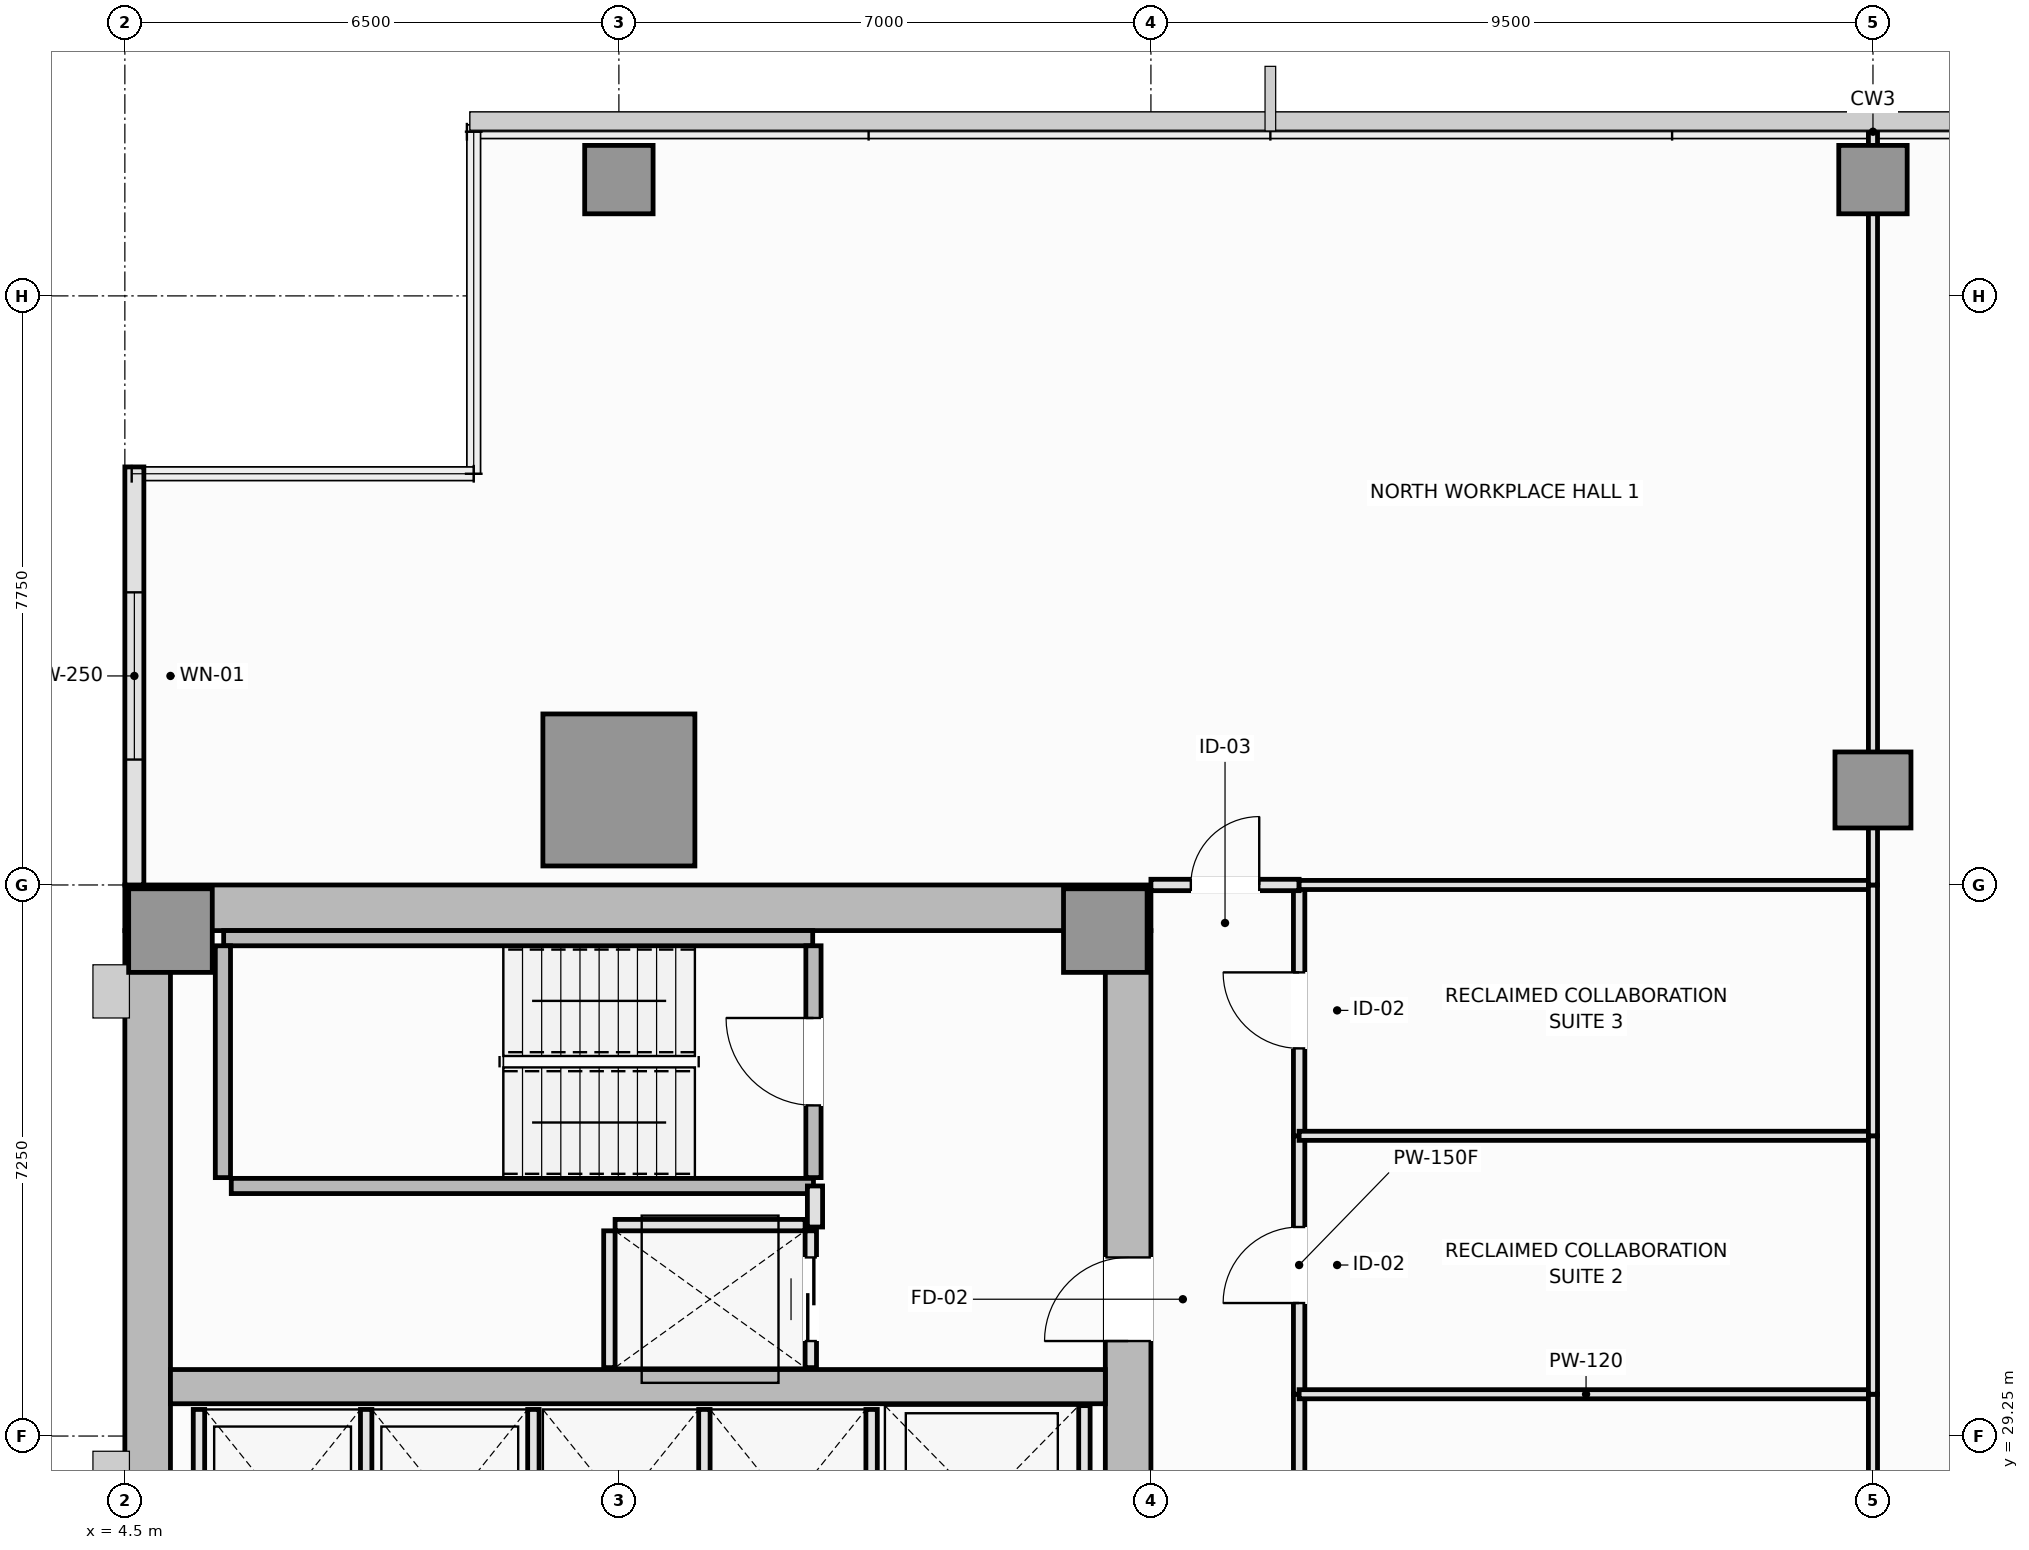
"""IFC4 building model, lengths in metres.
Left out: names, types, materials, properties, quantities, classifications, styles, units other than length and angle.
Written with IfcOpenShell. Run it as: python <this file> out.ifc"""

import sys

from ifc_helpers import new_model, si_unit, direction, frame, frame_2d, origin, origin_2d, place, context, subcontext, project, spatial, rectangle, extrude, element, fill, save


model = new_model("IFC4")
c1 = context("Model", 3, precision=1e-05, world=origin(), true_north=direction((0.0, 1.0)))
c2 = subcontext(c1, "Body", "Model", "MODEL_VIEW")
j1 = project(units=[si_unit("LENGTHUNIT", "METRE"), si_unit("PLANEANGLEUNIT", "RADIAN")], contexts=[c1])
p1 = place(None, origin())
s1 = spatial("IfcSite", under=j1, at=p1, CompositionType="ELEMENT")
p2 = place(p1, origin())
s2 = spatial("IfcBuilding", under=s1, at=p2, CompositionType="ELEMENT")
p3 = place(p2, frame((0.0, 0.0, 134.2)))
s3 = spatial("IfcBuildingStorey", under=s2, at=p3, CompositionType="ELEMENT", Elevation=134.2)
p4 = place(p3, frame((4.5, 36.2, 0.0), z_axis=(0.0, 0.0, 1.0), x_axis=(1.0, 0.0, 0.0)))
e1 = element("IfcWall", 1, at=p4, inside=s3, PredefinedType="SHEAR", context=c2, shape_type="SweptSolid", body=[
    extrude(rectangle(XDim=13.5, YDim=0.6, at=frame_2d((6.75, 0.0))), origin(), (0.0, 0.0, 1.0), 3.55),
])
p5 = place(p3, frame((4.8, 14.6, 0.0), z_axis=(0.0, 0.0, 1.0), x_axis=(0.0, 1.0, 0.0)))
e2 = element("IfcWall", 2, at=p5, inside=s3, PredefinedType="SHEAR", context=c2, shape_type="SweptSolid", body=[
    extrude(rectangle(XDim=21.3, YDim=0.6, at=frame_2d((10.65, 0.0))), origin(), (0.0, 0.0, 1.0), 3.55),
])
p6 = place(p3, frame((17.7, 27.05, 0.0), z_axis=(0.0, 0.0, 1.0), x_axis=(0.0, 1.0, 0.0)))
e3 = element("IfcWall", 3, at=p6, inside=s3, PredefinedType="SHEAR", context=c2, shape_type="SweptSolid", body=[
    extrude(rectangle(XDim=8.85, YDim=0.6, at=frame_2d((4.425, 0.0))), origin(), (0.0, 0.0, 1.0), 3.55),
])
p7 = place(p6, frame((3.45, 0.0, 0.0)))
e4 = element("IfcOpeningElement", 4, at=p7, cuts=e3, PredefinedType="OPENING", context=c2, shape_type="SweptSolid", body=[
    extrude(rectangle(XDim=1.1, YDim=2.15, at=frame_2d((0.55, 1.075))), frame((0.0, 0.31, 0.0), z_axis=(0.0, -1.0, 0.0), x_axis=(1.0, 0.0, 0.0)), (0.0, 0.0, 1.0), 0.62),
])
p8 = place(p3, frame((5.1, 29.9, 0.0), z_axis=(0.0, 0.0, 1.0), x_axis=(1.0, 0.0, 0.0)))
e5 = element("IfcWall", 5, at=p8, inside=s3, PredefinedType="SHEAR", context=c2, shape_type="SweptSolid", body=[
    extrude(rectangle(XDim=12.3, YDim=0.45, at=frame_2d((6.15, 0.0))), origin(), (0.0, 0.0, 1.0), 3.55),
])
for number, where, z_axis, x_axis in (
    (6, (5.1, 35.9, 0.0), (0.0, 0.0, 1.0), (1.0, 0.0, 0.0)),
    (7, (17.4, 35.9, 0.0), (0.0, 0.0, 1.0), (1.0, 0.0, 0.0)),
):
    element("IfcColumn", number, at=place(p3, frame(where, z_axis=z_axis, x_axis=x_axis)), inside=s3, PredefinedType="PILASTER", context=c2, shape_type="SweptSolid", body=[
        extrude(rectangle(XDim=1.1, YDim=1.1, at=origin_2d()), origin(), (0.0, 0.0, 1.0), 3.55),
    ])
p9 = place(p3, frame((11.0, 37.75, 0.0), z_axis=(0.0, 0.0, 1.0), x_axis=(1.0, 0.0, 0.0)))
e8 = element("IfcColumn", 8, at=p9, inside=s3, PredefinedType="COLUMN", context=c2, shape_type="SweptSolid", body=[
    extrude(rectangle(XDim=2.0, YDim=2.0, at=origin_2d()), origin(), (0.0, 0.0, 1.0), 3.55),
])
p10 = place(p3, frame((27.5, 37.75, 0.0), z_axis=(0.0, 0.0, 1.0), x_axis=(1.0, 0.0, 0.0)))
e9 = element("IfcColumn", 9, at=p10, inside=s3, PredefinedType="COLUMN", context=c2, shape_type="SweptSolid", body=[
    extrude(rectangle(XDim=1.0, YDim=1.0, at=origin_2d()), origin(), (0.0, 0.0, 1.0), 3.55),
])
for number, where, z_axis, x_axis in (
    (10, (11.0, 45.78, 0.0), (0.0, 0.0, 1.0), (1.0, 0.0, 0.0)),
    (11, (27.5, 45.78, 0.0), (0.0, 0.0, 1.0), (1.0, 0.0, 0.0)),
):
    element("IfcColumn", number, at=place(p3, frame(where, z_axis=z_axis, x_axis=x_axis)), inside=s3, PredefinedType="COLUMN", context=c2, shape_type="SweptSolid", body=[
        extrude(rectangle(XDim=0.9, YDim=0.9, at=origin_2d()), origin(), (0.0, 0.0, 1.0), 3.55),
    ])
p11 = place(p3, frame((4.625, 42.0, 0.0), z_axis=(0.0, 0.0, 1.0), x_axis=(0.0, -1.0, 0.0)))
e12 = element("IfcWall", 12, at=p11, inside=s3, PredefinedType="SOLIDWALL", context=c2, shape_type="SweptSolid", body=[
    extrude(rectangle(XDim=5.5, YDim=0.25, at=frame_2d((2.75, 0.0))), origin(), (0.0, 0.0, 1.0), 3.37),
])
p12 = place(p11, frame((1.65, 0.0, 0.9)))
e13 = element("IfcOpeningElement", 13, at=p12, cuts=e12, PredefinedType="OPENING", context=c2, shape_type="SweptSolid", body=[
    extrude(rectangle(XDim=2.2, YDim=1.8, at=frame_2d((1.1, 0.9))), frame((0.0, 0.135, 0.0), z_axis=(0.0, -1.0, 0.0), x_axis=(1.0, 0.0, 0.0)), (0.0, 0.0, 1.0), 0.27),
])
p13 = place(p3, frame((5.8, 35.8, 0.0), z_axis=(0.0, 0.0, 1.0), x_axis=(1.0, 0.0, 0.0)))
e14 = element("IfcWall", 14, at=p13, inside=s3, PredefinedType="SOLIDWALL", context=c2, shape_type="SweptSolid", body=[
    extrude(rectangle(XDim=7.75, YDim=0.2, at=frame_2d((3.875, 0.0))), origin(), (0.0, 0.0, 1.0), 3.55),
])
p14 = place(p3, frame((5.79, 32.65, 0.0), z_axis=(0.0, 0.0, 1.0), x_axis=(0.0, 1.0, 0.0)))
e15 = element("IfcWall", 15, at=p14, inside=s3, PredefinedType="SOLIDWALL", context=c2, shape_type="SweptSolid", body=[
    extrude(rectangle(XDim=3.05, YDim=0.2, at=frame_2d((1.525, 0.0))), origin(), (0.0, 0.0, 1.0), 3.55),
])
p15 = place(p3, frame((5.9, 32.54, 0.0), z_axis=(0.0, 0.0, 1.0), x_axis=(1.0, 0.0, 0.0)))
e16 = element("IfcWall", 16, at=p15, inside=s3, PredefinedType="SOLIDWALL", context=c2, shape_type="SweptSolid", body=[
    extrude(rectangle(XDim=7.66, YDim=0.2, at=frame_2d((3.83, 0.0))), origin(), (0.0, 0.0, 1.0), 3.55),
])
p16 = place(p3, frame((13.56, 32.65, 0.0), z_axis=(0.0, 0.0, 1.0), x_axis=(0.0, 1.0, 0.0)))
e17 = element("IfcWall", 17, at=p16, inside=s3, PredefinedType="SOLIDWALL", context=c2, shape_type="SweptSolid", body=[
    extrude(rectangle(XDim=3.05, YDim=0.2, at=frame_2d((1.525, 0.0))), origin(), (0.0, 0.0, 1.0), 3.55),
])
p17 = place(p16, frame((0.95, 0.0, 0.0)))
e18 = element("IfcOpeningElement", 18, at=p17, cuts=e17, PredefinedType="OPENING", context=c2, shape_type="SweptSolid", body=[
    extrude(rectangle(XDim=1.15, YDim=2.15, at=frame_2d((0.575, 1.075))), frame((0.0, 0.11, 0.0), z_axis=(0.0, -1.0, 0.0), x_axis=(1.0, 0.0, 0.0)), (0.0, 0.0, 1.0), 0.22),
])
for number, where, z_axis, x_axis in (
    (19, (5.475, 27.05, 0.0), (0.0, 0.0, 1.0), (0.0, 1.0, 0.0)),
    (20, (7.675, 27.05, 0.0), (0.0, 0.0, 1.0), (0.0, 1.0, 0.0)),
    (21, (9.875, 27.05, 0.0), (0.0, 0.0, 1.0), (0.0, 1.0, 0.0)),
    (22, (12.125, 27.05, 0.0), (0.0, 0.0, 1.0), (0.0, 1.0, 0.0)),
    (23, (14.325, 27.05, 0.0), (0.0, 0.0, 1.0), (0.0, 1.0, 0.0)),
):
    element("IfcWall", number, at=place(p3, frame(where, z_axis=z_axis, x_axis=x_axis)), inside=s3, PredefinedType="PARTITIONING", context=c2, shape_type="SweptSolid", body=[
        extrude(rectangle(XDim=2.55, YDim=0.15, at=frame_2d((1.275, 0.0))), origin(), (0.0, 0.0, 1.0), 3.37),
    ])
p18 = place(p3, frame((17.125, 27.05, 0.0), z_axis=(0.0, 0.0, 1.0), x_axis=(0.0, 1.0, 0.0)))
e24 = element("IfcWall", 24, at=p18, inside=s3, PredefinedType="PARTITIONING", context=c2, shape_type="SweptSolid", body=[
    extrude(rectangle(XDim=2.6, YDim=0.15, at=frame_2d((1.3, 0.0))), origin(), (0.0, 0.0, 1.0), 3.37),
])
p19 = place(p3, frame((10.95, 32.025, 0.0), z_axis=(0.0, 0.0, 1.0), x_axis=(1.0, 0.0, 0.0)))
e25 = element("IfcWall", 25, at=p19, inside=s3, PredefinedType="PARTITIONING", context=c2, shape_type="SweptSolid", body=[
    extrude(rectangle(XDim=2.5, YDim=0.15, at=frame_2d((1.25, 0.0))), origin(), (0.0, 0.0, 1.0), 3.37),
])
p20 = place(p3, frame((10.875, 30.15, 0.0), z_axis=(0.0, 0.0, 1.0), x_axis=(0.0, 1.0, 0.0)))
e26 = element("IfcWall", 26, at=p20, inside=s3, PredefinedType="PARTITIONING", context=c2, shape_type="SweptSolid", body=[
    extrude(rectangle(XDim=1.8, YDim=0.15, at=frame_2d((0.9, 0.0))), origin(), (0.0, 0.0, 1.0), 3.37),
])
p21 = place(p3, frame((13.525, 30.15, 0.0), z_axis=(0.0, 0.0, 1.0), x_axis=(0.0, 1.0, 0.0)))
e27 = element("IfcWall", 27, at=p21, inside=s3, PredefinedType="PARTITIONING", context=c2, shape_type="SweptSolid", body=[
    extrude(rectangle(XDim=1.8, YDim=0.15, at=frame_2d((0.9, 0.0))), origin(), (0.0, 0.0, 1.0), 3.37),
])
p22 = place(p21, frame((0.35, 0.0, 0.0)))
e28 = element("IfcOpeningElement", 28, at=p22, cuts=e27, PredefinedType="OPENING", context=c2, shape_type="SweptSolid", body=[
    extrude(rectangle(XDim=1.1, YDim=2.2, at=frame_2d((0.55, 1.1))), frame((0.0, 0.085, 0.0), z_axis=(0.0, -1.0, 0.0), x_axis=(1.0, 0.0, 0.0)), (0.0, 0.0, 1.0), 0.17),
])
p23 = place(p3, frame((13.58, 32.0, 0.0), z_axis=(0.0, 0.0, 1.0), x_axis=(0.0, 1.0, 0.0)))
e29 = element("IfcWall", 29, at=p23, inside=s3, PredefinedType="PARTITIONING", context=c2, shape_type="SweptSolid", body=[
    extrude(rectangle(XDim=0.54, YDim=0.2, at=frame_2d((0.27, 0.0))), origin(), (0.0, 0.0, 1.0), 3.37),
])
p24 = place(p3, frame((19.95, 23.55, 0.0), z_axis=(0.0, 0.0, 1.0), x_axis=(0.0, 1.0, 0.0)))
e30 = element("IfcWall", 30, at=p24, inside=s3, PredefinedType="PARTITIONING", context=c2, shape_type="SweptSolid", body=[
    extrude(rectangle(XDim=6.25, YDim=0.15, at=frame_2d((3.125, 0.0))), origin(), (0.0, 0.0, 1.0), 3.37),
])
p25 = place(p24, frame((2.625, 0.0, 0.0)))
e31 = element("IfcOpeningElement", 31, at=p25, cuts=e30, PredefinedType="OPENING", context=c2, shape_type="SweptSolid", body=[
    extrude(rectangle(XDim=1.0, YDim=2.15, at=frame_2d((0.5, 1.075))), frame((0.0, 0.085, 0.0), z_axis=(0.0, -1.0, 0.0), x_axis=(1.0, 0.0, 0.0)), (0.0, 0.0, 1.0), 0.17),
])
p26 = place(p3, frame((19.95, 29.8, 0.0), z_axis=(0.0, 0.0, 1.0), x_axis=(0.0, 1.0, 0.0)))
e32 = element("IfcWall", 32, at=p26, inside=s3, PredefinedType="PARTITIONING", context=c2, shape_type="SweptSolid", body=[
    extrude(rectangle(XDim=3.4, YDim=0.15, at=frame_2d((1.7, 0.0))), origin(), (0.0, 0.0, 1.0), 3.37),
])
p27 = place(p26, frame((1.2, 0.0, 0.0)))
e33 = element("IfcOpeningElement", 33, at=p27, cuts=e32, PredefinedType="OPENING", context=c2, shape_type="SweptSolid", body=[
    extrude(rectangle(XDim=1.0, YDim=2.15, at=frame_2d((0.5, 1.075))), frame((0.0, 0.085, 0.0), z_axis=(0.0, -1.0, 0.0), x_axis=(1.0, 0.0, 0.0)), (0.0, 0.0, 1.0), 0.17),
])
p28 = place(p3, frame((19.95, 33.2, 0.0), z_axis=(0.0, 0.0, 1.0), x_axis=(0.0, 1.0, 0.0)))
e34 = element("IfcWall", 34, at=p28, inside=s3, PredefinedType="PARTITIONING", context=c2, shape_type="SweptSolid", body=[
    extrude(rectangle(XDim=3.3, YDim=0.15, at=frame_2d((1.65, 0.0))), origin(), (0.0, 0.0, 1.0), 3.37),
])
p29 = place(p28, frame((1.15, 0.0, 0.0)))
e35 = element("IfcOpeningElement", 35, at=p29, cuts=e34, PredefinedType="OPENING", context=c2, shape_type="SweptSolid", body=[
    extrude(rectangle(XDim=1.0, YDim=2.15, at=frame_2d((0.5, 1.075))), frame((0.0, 0.085, 0.0), z_axis=(0.0, -1.0, 0.0), x_axis=(1.0, 0.0, 0.0)), (0.0, 0.0, 1.0), 0.17),
])
p30 = place(p3, frame((18.0, 36.5, 0.0), z_axis=(0.0, 0.0, 1.0), x_axis=(1.0, 0.0, 0.0)))
e36 = element("IfcWall", 36, at=p30, inside=s3, PredefinedType="PARTITIONING", context=c2, shape_type="SweptSolid", body=[
    extrude(rectangle(XDim=1.95, YDim=0.15, at=frame_2d((0.975, 0.0))), origin(), (0.0, 0.0, 1.0), 3.37),
])
p31 = place(p30, frame((0.525, 0.0, 0.0)))
e37 = element("IfcOpeningElement", 37, at=p31, cuts=e36, PredefinedType="OPENING", context=c2, shape_type="SweptSolid", body=[
    extrude(rectangle(XDim=0.9, YDim=2.1, at=frame_2d((0.45, 1.05))), frame((0.0, 0.085, 0.0), z_axis=(0.0, -1.0, 0.0), x_axis=(1.0, 0.0, 0.0)), (0.0, 0.0, 1.0), 0.17),
])
p32 = place(p3, frame((19.95, 29.8, 0.0), z_axis=(0.0, 0.0, 1.0), x_axis=(1.0, 0.0, 0.0)))
e38 = element("IfcWall", 38, at=p32, inside=s3, PredefinedType="PARTITIONING", context=c2, shape_type="SweptSolid", body=[
    extrude(rectangle(XDim=7.55, YDim=0.12, at=frame_2d((3.775, 0.0))), origin(), (0.0, 0.0, 1.0), 3.37),
])
p33 = place(p3, frame((27.5, 23.55, 0.0), z_axis=(0.0, 0.0, 1.0), x_axis=(0.0, 1.0, 0.0)))
e39 = element("IfcWall", 39, at=p33, inside=s3, PredefinedType="PARTITIONING", context=c2, shape_type="SweptSolid", body=[
    extrude(rectangle(XDim=6.25, YDim=0.12, at=frame_2d((3.125, 0.0))), origin(), (0.0, 0.0, 1.0), 3.37),
])
p34 = place(p3, frame((19.95, 33.2, 0.0), z_axis=(0.0, 0.0, 1.0), x_axis=(1.0, 0.0, 0.0)))
e40 = element("IfcWall", 40, at=p34, inside=s3, PredefinedType="PARTITIONING", context=c2, shape_type="SweptSolid", body=[
    extrude(rectangle(XDim=7.55, YDim=0.12, at=frame_2d((3.775, 0.0))), origin(), (0.0, 0.0, 1.0), 3.37),
])
p35 = place(p3, frame((27.5, 29.8, 0.0), z_axis=(0.0, 0.0, 1.0), x_axis=(0.0, 1.0, 0.0)))
e41 = element("IfcWall", 41, at=p35, inside=s3, PredefinedType="PARTITIONING", context=c2, shape_type="SweptSolid", body=[
    extrude(rectangle(XDim=3.4, YDim=0.12, at=frame_2d((1.7, 0.0))), origin(), (0.0, 0.0, 1.0), 3.37),
])
p36 = place(p3, frame((19.95, 36.5, 0.0), z_axis=(0.0, 0.0, 1.0), x_axis=(1.0, 0.0, 0.0)))
e42 = element("IfcWall", 42, at=p36, inside=s3, PredefinedType="PARTITIONING", context=c2, shape_type="SweptSolid", body=[
    extrude(rectangle(XDim=7.55, YDim=0.12, at=frame_2d((3.775, 0.0))), origin(), (0.0, 0.0, 1.0), 3.37),
])
p37 = place(p3, frame((27.5, 33.2, 0.0), z_axis=(0.0, 0.0, 1.0), x_axis=(0.0, 1.0, 0.0)))
e43 = element("IfcWall", 43, at=p37, inside=s3, PredefinedType="PARTITIONING", context=c2, shape_type="SweptSolid", body=[
    extrude(rectangle(XDim=3.3, YDim=0.12, at=frame_2d((1.65, 0.0))), origin(), (0.0, 0.0, 1.0), 3.37),
])
p38 = place(p3, frame((27.5, 36.5, 0.0), z_axis=(0.0, 0.0, 1.0), x_axis=(0.0, 1.0, 0.0)))
e44 = element("IfcWall", 44, at=p38, inside=s3, PredefinedType="PARTITIONING", context=c2, shape_type="SweptSolid", body=[
    extrude(rectangle(XDim=9.99, YDim=0.12, at=frame_2d((4.995, 0.0))), origin(), (0.0, 0.0, 1.0), 2.87),
])
p39 = place(p12, origin())
e45 = element("IfcWindow", 45, at=p39, inside=s3, PartitioningType="SINGLE_PANEL", PredefinedType="WINDOW", context=c2, shape_type="SweptSolid", body=[
    extrude(rectangle(XDim=2.2, YDim=1.8, at=frame_2d((1.1, 0.9))), frame((0.0, 0.03, 0.0), z_axis=(0.0, -1.0, 0.0), x_axis=(1.0, 0.0, 0.0)), (0.0, 0.0, 1.0), 0.06),
])
fill(e13, e45)
p40 = place(p17, origin())
e46 = element("IfcDoor", 46, at=p40, inside=s3, OperationType="SINGLE_SWING_RIGHT", PredefinedType="DOOR", context=c2, shape_type="SweptSolid", body=[
    extrude(rectangle(XDim=1.15, YDim=2.15, at=frame_2d((0.575, 1.075))), frame((0.0, 0.025, 0.0), z_axis=(0.0, -1.0, 0.0), x_axis=(1.0, 0.0, 0.0)), (0.0, 0.0, 1.0), 0.05),
])
fill(e18, e46)
p41 = place(p22, origin())
e47 = element("IfcDoor", 47, at=p41, inside=s3, OperationType="DOUBLE_DOOR_SLIDING", PredefinedType="DOOR", context=c2, shape_type="SweptSolid", body=[
    extrude(rectangle(XDim=1.1, YDim=2.2, at=frame_2d((0.55, 1.1))), frame((0.0, 0.025, 0.0), z_axis=(0.0, -1.0, 0.0), x_axis=(1.0, 0.0, 0.0)), (0.0, 0.0, 1.0), 0.05),
])
fill(e28, e47)
p42 = place(p7, origin())
e48 = element("IfcDoor", 48, at=p42, inside=s3, OperationType="SINGLE_SWING_LEFT", PredefinedType="DOOR", context=c2, shape_type="SweptSolid", body=[
    extrude(rectangle(XDim=1.1, YDim=2.15, at=frame_2d((0.55, 1.075))), frame((0.0, 0.025, 0.0), z_axis=(0.0, -1.0, 0.0), x_axis=(1.0, 0.0, 0.0)), (0.0, 0.0, 1.0), 0.05),
])
fill(e4, e48)
p43 = place(p27, origin())
e49 = element("IfcDoor", 49, at=p43, inside=s3, OperationType="SINGLE_SWING_LEFT", PredefinedType="DOOR", context=c2, shape_type="SweptSolid", body=[
    extrude(rectangle(XDim=1.0, YDim=2.15, at=frame_2d((0.5, 1.075))), frame((0.0, 0.025, 0.0), z_axis=(0.0, -1.0, 0.0), x_axis=(1.0, 0.0, 0.0)), (0.0, 0.0, 1.0), 0.05),
])
fill(e33, e49)
p44 = place(p29, origin())
e50 = element("IfcDoor", 50, at=p44, inside=s3, OperationType="SINGLE_SWING_RIGHT", PredefinedType="DOOR", context=c2, shape_type="SweptSolid", body=[
    extrude(rectangle(XDim=1.0, YDim=2.15, at=frame_2d((0.5, 1.075))), frame((0.0, 0.025, 0.0), z_axis=(0.0, -1.0, 0.0), x_axis=(1.0, 0.0, 0.0)), (0.0, 0.0, 1.0), 0.05),
])
fill(e35, e50)
p45 = place(p31, origin())
e51 = element("IfcDoor", 51, at=p45, inside=s3, OperationType="SINGLE_SWING_RIGHT", PredefinedType="DOOR", context=c2, shape_type="SweptSolid", body=[
    extrude(rectangle(XDim=0.9, YDim=2.1, at=frame_2d((0.45, 1.05))), frame((0.0, 0.025, 0.0), z_axis=(0.0, -1.0, 0.0), x_axis=(1.0, 0.0, 0.0)), (0.0, 0.0, 1.0), 0.05),
])
fill(e37, e51)
save(model, sys.argv[1])
